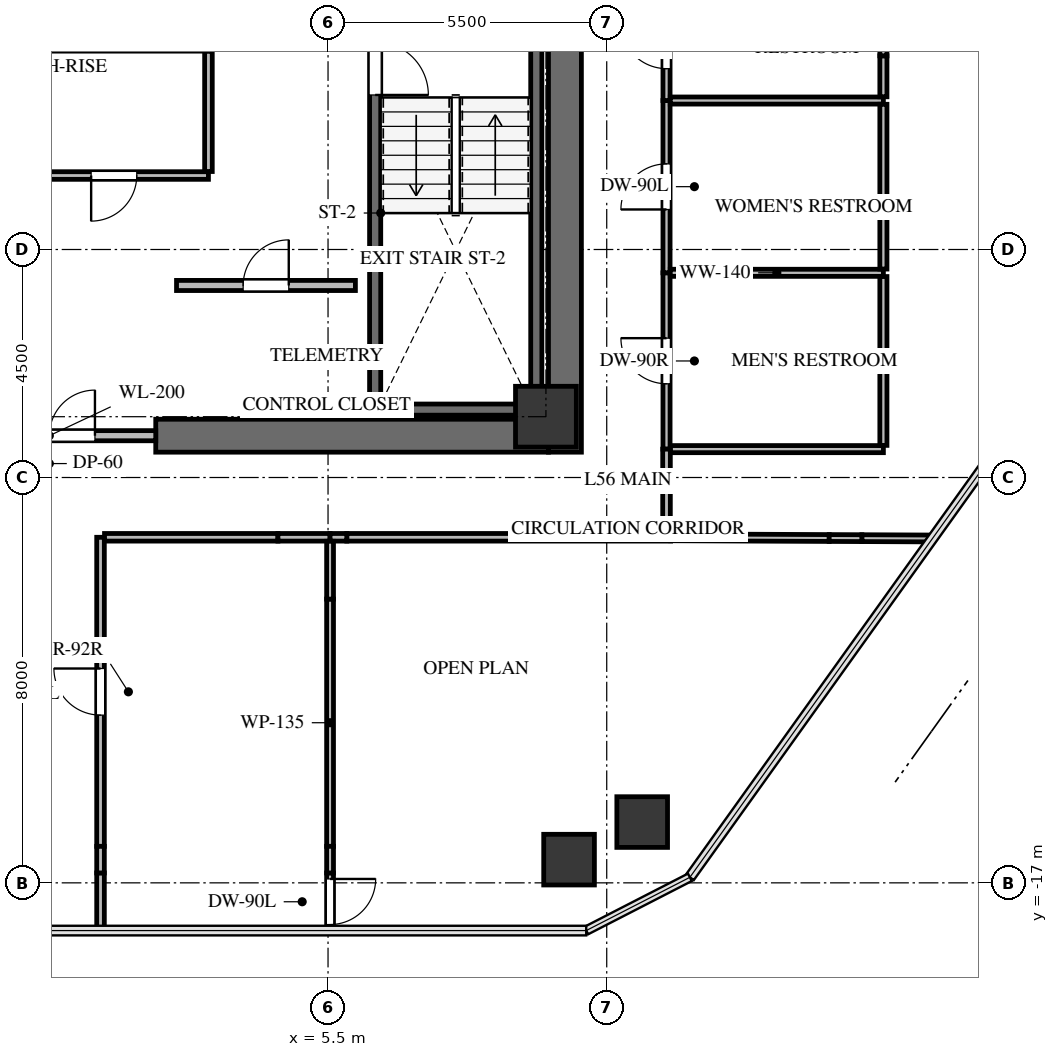
"""IFC4 building model, lengths in metres.
Left out: names, types, materials, properties, quantities, classifications, styles, units other than length and angle.
Written with IfcOpenShell. Run it as: python <this file> out.ifc"""

import sys

from ifc_helpers import new_model, si_unit, direction, frame, frame_2d, origin, origin_2d, place, context, subcontext, project, spatial, rectangle, extrude, source, transform, mapped, element, fill, save


model = new_model("IFC4")
c1 = context("Model", 3, precision=1e-05, world=origin(), true_north=direction((0.0, 1.0)))
c2 = subcontext(c1, "Body", "Model", "MODEL_VIEW")
j1 = project(units=[si_unit("LENGTHUNIT", "METRE"), si_unit("PLANEANGLEUNIT", "RADIAN")], contexts=[c1])
p1 = place(None, origin())
s1 = spatial("IfcSite", under=j1, at=p1, CompositionType="ELEMENT")
p2 = place(p1, origin())
s2 = spatial("IfcBuilding", under=s1, at=p2, CompositionType="ELEMENT")
p3 = place(p2, frame((0.0, 0.0, 203.2)))
s3 = spatial("IfcBuildingStorey", under=s2, at=p3, CompositionType="ELEMENT", Elevation=203.2)
p4 = place(p3, frame((10.175, -8.5, 0.0), z_axis=(0.0, 0.0, 1.0), x_axis=(0.0, 1.0, 0.0)))
e1 = element("IfcWall", 1, at=p4, inside=s3, PredefinedType="SHEAR", context=c2, shape_type="SweptSolid", body=[
    extrude(rectangle(XDim=17.0, YDim=0.65, at=frame_2d((8.5, 0.0))), origin(), (0.0, 0.0, 1.0), 3.0),
])
p5 = place(p3, frame((2.1, -8.175, 0.0), z_axis=(0.0, 0.0, 1.0), x_axis=(1.0, 0.0, 0.0)))
e2 = element("IfcWall", 2, at=p5, inside=s3, PredefinedType="SHEAR", context=c2, shape_type="SweptSolid", body=[
    extrude(rectangle(XDim=7.75, YDim=0.65, at=frame_2d((3.875, 0.0))), origin(), (0.0, 0.0, 1.0), 3.0),
])
p6 = place(p3, frame((9.61, -7.77, -0.24), z_axis=(0.0, 0.0, 1.0), x_axis=(0.0, 1.0, 0.0)))
e3 = element("IfcWall", 3, at=p6, inside=s3, PredefinedType="SHEAR", context=c2, shape_type="SweptSolid", body=[
    extrude(rectangle(XDim=7.89, YDim=0.22, at=frame_2d((3.945, 0.0))), origin(), (0.0, 0.0, 1.0), 3.0),
])
p7 = place(p3, frame((6.43, 0.12, -0.24), z_axis=(0.0, 0.0, 1.0), x_axis=(0.0, -1.0, 0.0)))
e4 = element("IfcWall", 4, at=p7, inside=s3, PredefinedType="SHEAR", context=c2, shape_type="SweptSolid", body=[
    extrude(rectangle(XDim=7.89, YDim=0.22, at=frame_2d((3.945, 0.0))), origin(), (0.0, 0.0, 1.0), 3.0),
])
p8 = place(p7, frame((0.52, 0.0, 0.0)))
e5 = element("IfcOpeningElement", 5, at=p8, cuts=e4, PredefinedType="OPENING", context=c2, shape_type="SweptSolid", body=[
    extrude(rectangle(XDim=1.05, YDim=2.15, at=frame_2d((0.525, 1.075))), frame((0.0, 0.12, 0.0), z_axis=(0.0, -1.0, 0.0), x_axis=(1.0, 0.0, 0.0)), (0.0, 0.0, 1.0), 0.24),
])
p9 = place(p3, frame((6.54, -7.66, -0.24), z_axis=(0.0, 0.0, 1.0), x_axis=(1.0, 0.0, 0.0)))
e6 = element("IfcWall", 6, at=p9, inside=s3, PredefinedType="SHEAR", context=c2, shape_type="SweptSolid", body=[
    extrude(rectangle(XDim=2.96, YDim=0.22, at=frame_2d((1.48, 0.0))), origin(), (0.0, 0.0, 1.0), 3.0),
])
m1 = source(origin(), c2, "Body", "SweptSolid", [
    extrude(rectangle(XDim=1.2, YDim=1.2, at=origin_2d()), origin(), (0.0, 0.0, 1.0), 3.0),
])
p10 = place(p3, frame((9.8, -7.8, -0.24), z_axis=(0.0, 0.0, 1.0), x_axis=(1.0, 0.0, 0.0)))
e7 = element("IfcColumn", 7, at=p10, inside=s3, PredefinedType="COLUMN", context=c2, shape_type="MappedRepresentation", body=[
    mapped(m1, transform((0.0, 0.0, 0.0), x_axis=(1.0, 0.0, 0.0), y_axis=(0.0, 1.0, 0.0), z_axis=(0.0, 0.0, 1.0), scale=1.0)),
])
m2 = source(origin(), c2, "Body", "SweptSolid", [
    extrude(rectangle(XDim=1.0, YDim=1.0, at=origin_2d()), origin(), (0.0, 0.0, 1.0), 3.0),
])
for number, where, z_axis, x_axis in (
    (8, (11.7, -15.8, -0.24), (0.0, 0.0, 1.0), (1.0, 0.0, 0.0)),
    (9, (10.257, -16.542, -0.24), (0.0, 0.0, 1.0), (1.0, 0.0, 0.0)),
):
    element("IfcColumn", number, at=place(p3, frame(where, z_axis=z_axis, x_axis=x_axis)), inside=s3, PredefinedType="COLUMN", context=c2, shape_type="MappedRepresentation", body=[
        mapped(m2, transform((0.0, 0.0, 0.0), x_axis=(1.0, 0.0, 0.0), y_axis=(0.0, 1.0, 0.0), z_axis=(0.0, 0.0, 1.0), scale=1.0)),
    ])
p11 = place(p3, frame((-2.1, -8.175, 0.0), z_axis=(0.0, 0.0, 1.0), x_axis=(1.0, 0.0, 0.0)))
e10 = element("IfcWall", 10, at=p11, inside=s3, PredefinedType="SOLIDWALL", context=c2, shape_type="SweptSolid", body=[
    extrude(rectangle(XDim=4.2, YDim=0.2, at=frame_2d((2.1, 0.0))), origin(), (0.0, 0.0, 1.0), 2.745),
])
p12 = place(p11, frame((1.2, 0.0, 0.0)))
e11 = element("IfcOpeningElement", 11, at=p12, cuts=e10, PredefinedType="OPENING", context=c2, shape_type="SweptSolid", body=[
    extrude(rectangle(XDim=1.8, YDim=2.15, at=frame_2d((0.9, 1.075))), frame((0.0, 0.11, 0.0), z_axis=(0.0, -1.0, 0.0), x_axis=(1.0, 0.0, 0.0)), (0.0, 0.0, 1.0), 0.22),
])
p13 = place(p3, frame((2.51, -5.21, 0.0), z_axis=(0.0, 0.0, 1.0), x_axis=(1.0, 0.0, 0.0)))
e12 = element("IfcWall", 12, at=p13, inside=s3, PredefinedType="SOLIDWALL", context=c2, shape_type="SweptSolid", body=[
    extrude(rectangle(XDim=3.53, YDim=0.2, at=frame_2d((1.765, 0.0))), origin(), (0.0, 0.0, 1.0), 2.745),
])
p14 = place(p13, frame((1.315, 0.0, 0.0)))
e13 = element("IfcOpeningElement", 13, at=p14, cuts=e12, PredefinedType="OPENING", context=c2, shape_type="SweptSolid", body=[
    extrude(rectangle(XDim=0.9, YDim=2.05, at=frame_2d((0.45, 1.025))), frame((0.0, 0.11, 0.0), z_axis=(0.0, -1.0, 0.0), x_axis=(1.0, 0.0, 0.0)), (0.0, 0.0, 1.0), 0.22),
])
p15 = place(p3, frame((3.14, -3.04, 0.0), z_axis=(0.0, 0.0, 1.0), x_axis=(-1.0, 0.0, 0.0)))
e14 = element("IfcWall", 14, at=p15, inside=s3, PredefinedType="PARTITIONING", context=c2, shape_type="SweptSolid", body=[
    extrude(rectangle(XDim=3.73, YDim=0.15, at=frame_2d((1.865, 0.0))), origin(), (0.0, 0.0, 1.0), 2.745),
])
p16 = place(p15, frame((1.415, 0.0, 0.0)))
e15 = element("IfcOpeningElement", 15, at=p16, cuts=e14, PredefinedType="OPENING", context=c2, shape_type="SweptSolid", body=[
    extrude(rectangle(XDim=0.9, YDim=2.05, at=frame_2d((0.45, 1.025))), frame((0.0, 0.085, 0.0), z_axis=(0.0, -1.0, 0.0), x_axis=(1.0, 0.0, 0.0)), (0.0, 0.0, 1.0), 0.17),
])
p17 = place(p3, frame((3.14, -0.589, 0.0), z_axis=(0.0, 0.0, 1.0), x_axis=(0.0, -1.0, 0.0)))
e16 = element("IfcWall", 16, at=p17, inside=s3, PredefinedType="PARTITIONING", context=c2, shape_type="SweptSolid", body=[
    extrude(rectangle(XDim=2.372, YDim=0.15, at=frame_2d((1.186, 0.0))), origin(), (0.0, 0.0, 1.0), 2.745),
])
p18 = place(p3, frame((12.18, -8.44, 0.0), z_axis=(0.0, 0.0, 1.0), x_axis=(0.0, 1.0, 0.0)))
e17 = element("IfcWall", 17, at=p18, inside=s3, PredefinedType="PARTITIONING", context=c2, shape_type="SweptSolid", body=[
    extrude(rectangle(XDim=3.48, YDim=0.14, at=frame_2d((1.74, 0.0))), origin(), (0.0, 0.0, 1.0), 2.745),
])
p19 = place(p18, frame((1.29, 0.0, 0.0)))
e18 = element("IfcOpeningElement", 18, at=p19, cuts=e17, PredefinedType="OPENING", context=c2, shape_type="SweptSolid", body=[
    extrude(rectangle(XDim=0.9, YDim=2.05, at=frame_2d((0.45, 1.025))), frame((0.0, 0.08, 0.0), z_axis=(0.0, -1.0, 0.0), x_axis=(1.0, 0.0, 0.0)), (0.0, 0.0, 1.0), 0.16),
])
p20 = place(p3, frame((12.18, -4.96, 0.0), z_axis=(0.0, 0.0, 1.0), x_axis=(0.0, 1.0, 0.0)))
e19 = element("IfcWall", 19, at=p20, inside=s3, PredefinedType="PARTITIONING", context=c2, shape_type="SweptSolid", body=[
    extrude(rectangle(XDim=3.4, YDim=0.14, at=frame_2d((1.7, 0.0))), origin(), (0.0, 0.0, 1.0), 2.745),
])
p21 = place(p20, frame((1.25, 0.0, 0.0)))
e20 = element("IfcOpeningElement", 20, at=p21, cuts=e19, PredefinedType="OPENING", context=c2, shape_type="SweptSolid", body=[
    extrude(rectangle(XDim=0.9, YDim=2.05, at=frame_2d((0.45, 1.025))), frame((0.0, 0.08, 0.0), z_axis=(0.0, -1.0, 0.0), x_axis=(1.0, 0.0, 0.0)), (0.0, 0.0, 1.0), 0.16),
])
p22 = place(p3, frame((12.18, -1.56, 0.0), z_axis=(0.0, 0.0, 1.0), x_axis=(0.0, 1.0, 0.0)))
e21 = element("IfcWall", 21, at=p22, inside=s3, PredefinedType="PARTITIONING", context=c2, shape_type="SweptSolid", body=[
    extrude(rectangle(XDim=2.159, YDim=0.14, at=frame_2d((1.08, 0.0))), origin(), (0.0, 0.0, 1.0), 2.745),
])
p23 = place(p22, frame((0.629, 0.0, 0.0)))
e22 = element("IfcOpeningElement", 22, at=p23, cuts=e21, PredefinedType="OPENING", context=c2, shape_type="SweptSolid", body=[
    extrude(rectangle(XDim=0.9, YDim=2.05, at=frame_2d((0.45, 1.025))), frame((0.0, 0.08, 0.0), z_axis=(0.0, -1.0, 0.0), x_axis=(1.0, 0.0, 0.0)), (0.0, 0.0, 1.0), 0.16),
])
p24 = place(p3, frame((1.01, -17.942, 0.0), z_axis=(0.0, 0.0, 1.0), x_axis=(0.0, 1.0, 0.0)))
e23 = element("IfcWall", 23, at=p24, inside=s3, PredefinedType="PARTITIONING", context=c2, shape_type="SweptSolid", body=[
    extrude(rectangle(XDim=1.137, YDim=0.15, at=frame_2d((0.569, 0.0))), origin(), (0.0, 0.0, 1.0), 2.745),
])
p25 = place(p3, frame((1.01, -16.28, 0.0), z_axis=(0.0, 0.0, 1.0), x_axis=(0.0, 1.0, 0.0)))
e24 = element("IfcWall", 24, at=p25, inside=s3, PredefinedType="PARTITIONING", context=c2, shape_type="SweptSolid", body=[
    extrude(rectangle(XDim=6.1, YDim=0.15, at=frame_2d((3.05, 0.0))), origin(), (0.0, 0.0, 1.0), 2.745),
])
p26 = place(p25, frame((2.59, 0.0, 0.0)))
e25 = element("IfcOpeningElement", 25, at=p26, cuts=e24, PredefinedType="OPENING", context=c2, shape_type="SweptSolid", body=[
    extrude(rectangle(XDim=0.92, YDim=2.1, at=frame_2d((0.46, 1.05))), frame((0.0, 0.085, 0.0), z_axis=(0.0, -1.0, 0.0), x_axis=(1.0, 0.0, 0.0)), (0.0, 0.0, 1.0), 0.17),
])
p27 = place(p3, frame((1.01, -16.804, 0.0), z_axis=(0.0, 0.0, 1.0), x_axis=(0.0, 1.0, 0.0)))
e26 = element("IfcWall", 26, at=p27, inside=s3, PredefinedType="PARTITIONING", context=c2, shape_type="SweptSolid", body=[
    extrude(rectangle(XDim=0.525, YDim=0.15, at=frame_2d((0.262, 0.0))), origin(), (0.0, 0.0, 1.0), 2.099),
])
p28 = place(p3, frame((1.089, -10.18, 0.0), z_axis=(0.0, 0.0, 1.0), x_axis=(1.0, 0.0, 0.0)))
e27 = element("IfcWall", 27, at=p28, inside=s3, PredefinedType="PARTITIONING", context=c2, shape_type="SweptSolid", body=[
    extrude(rectangle(XDim=3.422, YDim=0.15, at=frame_2d((1.711, 0.0))), origin(), (0.0, 0.0, 1.0), 1.942),
])
p29 = place(p3, frame((4.511, -10.18, 0.0), z_axis=(0.0, 0.0, 1.0), x_axis=(1.0, 0.0, 0.0)))
e28 = element("IfcWall", 28, at=p29, inside=s3, PredefinedType="PARTITIONING", context=c2, shape_type="SweptSolid", body=[
    extrude(rectangle(XDim=1.029, YDim=0.15, at=frame_2d((0.514, 0.0))), origin(), (0.0, 0.0, 1.0), 1.942),
])
p30 = place(p3, frame((5.87, -10.18, 0.0), z_axis=(0.0, 0.0, 1.0), x_axis=(1.0, 0.0, 0.0)))
e29 = element("IfcWall", 29, at=p30, inside=s3, PredefinedType="PARTITIONING", context=c2, shape_type="SweptSolid", body=[
    extrude(rectangle(XDim=6.39, YDim=0.15, at=frame_2d((3.195, 0.0))), origin(), (0.0, 0.0, 1.0), 1.942),
])
p31 = place(p3, frame((5.54, -10.18, 0.0), z_axis=(0.0, 0.0, 1.0), x_axis=(1.0, 0.0, 0.0)))
e30 = element("IfcWall", 30, at=p31, inside=s3, PredefinedType="PARTITIONING", context=c2, shape_type="SweptSolid", body=[
    extrude(rectangle(XDim=0.33, YDim=0.15, at=frame_2d((0.165, 0.0))), origin(), (0.0, 0.0, 1.0), 1.942),
])
p32 = place(p3, frame((12.18, -10.101, 0.0), z_axis=(0.0, 0.0, 1.0), x_axis=(0.0, 1.0, 0.0)))
e31 = element("IfcWall", 31, at=p32, inside=s3, PredefinedType="PARTITIONING", context=c2, shape_type="SweptSolid", body=[
    extrude(rectangle(XDim=1.661, YDim=0.15, at=frame_2d((0.831, 0.0))), origin(), (0.0, 0.0, 1.0), 2.745),
])
p33 = place(p3, frame((12.254, -4.96, 0.0), z_axis=(0.0, 0.0, 1.0), x_axis=(1.0, 0.0, 0.0)))
e32 = element("IfcWall", 32, at=p33, inside=s3, PredefinedType="PARTITIONING", context=c2, shape_type="SweptSolid", body=[
    extrude(rectangle(XDim=4.206, YDim=0.14, at=frame_2d((2.103, 0.0))), origin(), (0.0, 0.0, 1.0), 2.745),
])
p34 = place(p3, frame((16.46, -8.44, 0.0), z_axis=(0.0, 0.0, 1.0), x_axis=(-1.0, 0.0, 0.0)))
e33 = element("IfcWall", 33, at=p34, inside=s3, PredefinedType="PARTITIONING", context=c2, shape_type="SweptSolid", body=[
    extrude(rectangle(XDim=4.201, YDim=0.14, at=frame_2d((2.101, 0.0))), origin(), (0.0, 0.0, 1.0), 2.745),
])
p35 = place(p3, frame((16.46, -5.034, 0.0), z_axis=(0.0, 0.0, 1.0), x_axis=(0.0, -1.0, 0.0)))
e34 = element("IfcWall", 34, at=p35, inside=s3, PredefinedType="PARTITIONING", context=c2, shape_type="SweptSolid", body=[
    extrude(rectangle(XDim=3.332, YDim=0.14, at=frame_2d((1.666, 0.0))), origin(), (0.0, 0.0, 1.0), 2.745),
])
p36 = place(p3, frame((12.254, -1.56, 0.0), z_axis=(0.0, 0.0, 1.0), x_axis=(1.0, 0.0, 0.0)))
e35 = element("IfcWall", 35, at=p36, inside=s3, PredefinedType="PARTITIONING", context=c2, shape_type="SweptSolid", body=[
    extrude(rectangle(XDim=4.206, YDim=0.14, at=frame_2d((2.103, 0.0))), origin(), (0.0, 0.0, 1.0), 2.745),
])
p37 = place(p3, frame((16.46, -1.634, 0.0), z_axis=(0.0, 0.0, 1.0), x_axis=(0.0, -1.0, 0.0)))
e36 = element("IfcWall", 36, at=p37, inside=s3, PredefinedType="PARTITIONING", context=c2, shape_type="SweptSolid", body=[
    extrude(rectangle(XDim=3.252, YDim=0.14, at=frame_2d((1.626, 0.0))), origin(), (0.0, 0.0, 1.0), 2.745),
])
p38 = place(p3, frame((16.46, -0.678, 0.0), z_axis=(0.0, 0.0, 1.0), x_axis=(0.0, -1.0, 0.0)))
e37 = element("IfcWall", 37, at=p38, inside=s3, PredefinedType="PARTITIONING", context=c2, shape_type="SweptSolid", body=[
    extrude(rectangle(XDim=0.808, YDim=0.14, at=frame_2d((0.404, 0.0))), origin(), (0.0, 0.0, 1.0), 2.745),
])
p39 = place(p3, frame((16.46, -0.072, 0.0), z_axis=(0.0, 0.0, 1.0), x_axis=(0.0, -1.0, 0.0)))
e38 = element("IfcWall", 38, at=p39, inside=s3, PredefinedType="PARTITIONING", context=c2, shape_type="SweptSolid", body=[
    extrude(rectangle(XDim=0.606, YDim=0.14, at=frame_2d((0.303, 0.0))), origin(), (0.0, 0.0, 1.0), 1.942),
])
p40 = place(p3, frame((5.54, -11.4, 0.0), z_axis=(0.0, 0.0, 1.0), x_axis=(0.0, -1.0, 0.0)))
e39 = element("IfcWall", 39, at=p40, inside=s3, PredefinedType="PARTITIONING", context=c2, shape_type="SweptSolid", body=[
    extrude(rectangle(XDim=4.88, YDim=0.135, at=frame_2d((2.44, 0.0))), origin(), (0.0, 0.0, 1.0), 1.942),
])
p41 = place(p3, frame((5.54, -16.804, 0.0), z_axis=(0.0, 0.0, 1.0), x_axis=(0.0, -1.0, 0.0)))
e40 = element("IfcWall", 40, at=p41, inside=s3, PredefinedType="PARTITIONING", context=c2, shape_type="SweptSolid", body=[
    extrude(rectangle(XDim=1.137, YDim=0.135, at=frame_2d((0.569, 0.0))), origin(), (0.0, 0.0, 1.0), 2.745),
])
p42 = place(p41, frame((0.119, 0.0, 0.0)))
e41 = element("IfcOpeningElement", 41, at=p42, cuts=e40, PredefinedType="OPENING", context=c2, shape_type="SweptSolid", body=[
    extrude(rectangle(XDim=0.9, YDim=2.05, at=frame_2d((0.45, 1.025))), frame((0.0, 0.078, 0.0), z_axis=(0.0, -1.0, 0.0), x_axis=(1.0, 0.0, 0.0)), (0.0, 0.0, 1.0), 0.155),
])
p43 = place(p3, frame((5.54, -10.259, 0.0), z_axis=(0.0, 0.0, 1.0), x_axis=(0.0, -1.0, 0.0)))
e42 = element("IfcWall", 42, at=p43, inside=s3, PredefinedType="PARTITIONING", context=c2, shape_type="SweptSolid", body=[
    extrude(rectangle(XDim=1.141, YDim=0.135, at=frame_2d((0.57, 0.0))), origin(), (0.0, 0.0, 1.0), 1.942),
])
p44 = place(p3, frame((5.54, -16.28, 0.0), z_axis=(0.0, 0.0, 1.0), x_axis=(0.0, -1.0, 0.0)))
e43 = element("IfcWall", 43, at=p44, inside=s3, PredefinedType="PARTITIONING", context=c2, shape_type="SweptSolid", body=[
    extrude(rectangle(XDim=0.525, YDim=0.135, at=frame_2d((0.262, 0.0))), origin(), (0.0, 0.0, 1.0), 2.099),
])
p45 = place(p3, frame((12.26, -10.18, 0.0), z_axis=(0.0, 0.0, 1.0), x_axis=(0.999990120522, -0.004445093728, 0.0)))
e44 = element("IfcWall", 44, at=p45, inside=s3, PredefinedType="PARTITIONING", context=c2, shape_type="SweptSolid", body=[
    extrude(rectangle(XDim=3.131, YDim=0.135, at=frame_2d((1.565, 0.0))), origin(), (0.0, 0.0, 1.0), 2.745),
])
p46 = place(p3, frame((16.034, -10.197, 0.0), z_axis=(0.0, 0.0, 1.0), x_axis=(0.999989640625, -0.004551773574, 0.0)))
e45 = element("IfcWall", 45, at=p46, inside=s3, PredefinedType="PARTITIONING", context=c2, shape_type="SweptSolid", body=[
    extrude(rectangle(XDim=1.395, YDim=0.135, at=frame_2d((0.697, 0.0))), origin(), (0.0, 0.0, 1.0), 2.745),
])
p47 = place(p3, frame((15.391, -10.194, 0.0), z_axis=(0.0, 0.0, 1.0), x_axis=(0.999991299796, -0.00417137061, 0.0)))
e46 = element("IfcWall", 46, at=p47, inside=s3, PredefinedType="PARTITIONING", context=c2, shape_type="SweptSolid", body=[
    extrude(rectangle(XDim=0.644, YDim=0.135, at=frame_2d((0.322, 0.0))), origin(), (0.0, 0.0, 1.0), 2.099),
])
m3 = source(origin(), c2, "Body", "SweptSolid", [
    extrude(rectangle(XDim=1.05, YDim=2.15, at=frame_2d((0.525, 1.075))), frame((0.0, 0.025, 0.0), z_axis=(0.0, -1.0, 0.0), x_axis=(1.0, 0.0, 0.0)), (0.0, 0.0, 1.0), 0.05),
])
p48 = place(p8, origin())
e47 = element("IfcDoor", 47, at=p48, inside=s3, OperationType="SINGLE_SWING_RIGHT", PredefinedType="DOOR", context=c2, shape_type="MappedRepresentation", body=[
    mapped(m3, transform((0.0, 0.0, 0.0), x_axis=(1.0, 0.0, 0.0), y_axis=(0.0, 1.0, 0.0), z_axis=(0.0, 0.0, 1.0), scale=1.0)),
])
fill(e5, e47)
m4 = source(origin(), c2, "Body", "SweptSolid", [
    extrude(rectangle(XDim=1.8, YDim=2.15, at=frame_2d((0.9, 1.075))), frame((0.0, 0.025, 0.0), z_axis=(0.0, -1.0, 0.0), x_axis=(1.0, 0.0, 0.0)), (0.0, 0.0, 1.0), 0.05),
])
p49 = place(p12, origin())
e48 = element("IfcDoor", 48, at=p49, inside=s3, OperationType="DOUBLE_DOOR_SINGLE_SWING", PredefinedType="DOOR", context=c2, shape_type="MappedRepresentation", body=[
    mapped(m4, transform((0.0, 0.0, 0.0), x_axis=(1.0, 0.0, 0.0), y_axis=(0.0, 1.0, 0.0), z_axis=(0.0, 0.0, 1.0), scale=1.0)),
])
fill(e11, e48)
m5 = source(origin(), c2, "Body", "SweptSolid", [
    extrude(rectangle(XDim=0.9, YDim=2.05, at=frame_2d((0.45, 1.025))), frame((0.0, 0.025, 0.0), z_axis=(0.0, -1.0, 0.0), x_axis=(1.0, 0.0, 0.0)), (0.0, 0.0, 1.0), 0.05),
])
p50 = place(p14, origin())
e49 = element("IfcDoor", 49, at=p50, inside=s3, OperationType="SINGLE_SWING_RIGHT", PredefinedType="DOOR", context=c2, shape_type="MappedRepresentation", body=[
    mapped(m5, transform((0.0, 0.0, 0.0), x_axis=(1.0, 0.0, 0.0), y_axis=(0.0, 1.0, 0.0), z_axis=(0.0, 0.0, 1.0), scale=1.0)),
])
fill(e13, e49)
p51 = place(p16, origin())
e50 = element("IfcDoor", 50, at=p51, inside=s3, OperationType="SINGLE_SWING_RIGHT", PredefinedType="DOOR", context=c2, shape_type="MappedRepresentation", body=[
    mapped(m5, transform((0.0, 0.0, 0.0), x_axis=(1.0, 0.0, 0.0), y_axis=(0.0, 1.0, 0.0), z_axis=(0.0, 0.0, 1.0), scale=1.0)),
])
fill(e15, e50)
m6 = source(origin(), c2, "Body", "SweptSolid", [
    extrude(rectangle(XDim=0.9, YDim=2.05, at=frame_2d((0.45, 1.025))), frame((0.0, 0.025, 0.0), z_axis=(0.0, -1.0, 0.0), x_axis=(1.0, 0.0, 0.0)), (0.0, 0.0, 1.0), 0.05),
])
p52 = place(p19, origin())
e51 = element("IfcDoor", 51, at=p52, inside=s3, OperationType="SINGLE_SWING_RIGHT", PredefinedType="DOOR", context=c2, shape_type="MappedRepresentation", body=[
    mapped(m6, transform((0.0, 0.0, 0.0), x_axis=(1.0, 0.0, 0.0), y_axis=(0.0, 1.0, 0.0), z_axis=(0.0, 0.0, 1.0), scale=1.0)),
])
fill(e18, e51)
m7 = source(origin(), c2, "Body", "SweptSolid", [
    extrude(rectangle(XDim=0.9, YDim=2.05, at=frame_2d((0.45, 1.025))), frame((0.0, 0.025, 0.0), z_axis=(0.0, -1.0, 0.0), x_axis=(1.0, 0.0, 0.0)), (0.0, 0.0, 1.0), 0.05),
])
p53 = place(p21, origin())
e52 = element("IfcDoor", 52, at=p53, inside=s3, OperationType="SINGLE_SWING_LEFT", PredefinedType="DOOR", context=c2, shape_type="MappedRepresentation", body=[
    mapped(m7, transform((0.0, 0.0, 0.0), x_axis=(1.0, 0.0, 0.0), y_axis=(0.0, 1.0, 0.0), z_axis=(0.0, 0.0, 1.0), scale=1.0)),
])
fill(e20, e52)
p54 = place(p23, origin())
e53 = element("IfcDoor", 53, at=p54, inside=s3, OperationType="SINGLE_SWING_RIGHT", PredefinedType="DOOR", context=c2, shape_type="MappedRepresentation", body=[
    mapped(m6, transform((0.0, 0.0, 0.0), x_axis=(1.0, 0.0, 0.0), y_axis=(0.0, 1.0, 0.0), z_axis=(0.0, 0.0, 1.0), scale=1.0)),
])
fill(e22, e53)
m8 = source(origin(), c2, "Body", "SweptSolid", [
    extrude(rectangle(XDim=0.92, YDim=2.1, at=frame_2d((0.46, 1.05))), frame((0.0, 0.025, 0.0), z_axis=(0.0, -1.0, 0.0), x_axis=(1.0, 0.0, 0.0)), (0.0, 0.0, 1.0), 0.05),
])
p55 = place(p26, origin())
e54 = element("IfcDoor", 54, at=p55, inside=s3, OperationType="SINGLE_SWING_RIGHT", PredefinedType="DOOR", context=c2, shape_type="MappedRepresentation", body=[
    mapped(m8, transform((0.0, 0.0, 0.0), x_axis=(1.0, 0.0, 0.0), y_axis=(0.0, 1.0, 0.0), z_axis=(0.0, 0.0, 1.0), scale=1.0)),
])
fill(e25, e54)
p56 = place(p42, origin())
e55 = element("IfcDoor", 55, at=p56, inside=s3, OperationType="SINGLE_SWING_LEFT", PredefinedType="DOOR", context=c2, shape_type="MappedRepresentation", body=[
    mapped(m7, transform((0.0, 0.0, 0.0), x_axis=(1.0, 0.0, 0.0), y_axis=(0.0, 1.0, 0.0), z_axis=(0.0, 0.0, 1.0), scale=1.0)),
])
fill(e41, e55)
save(model, sys.argv[1])
